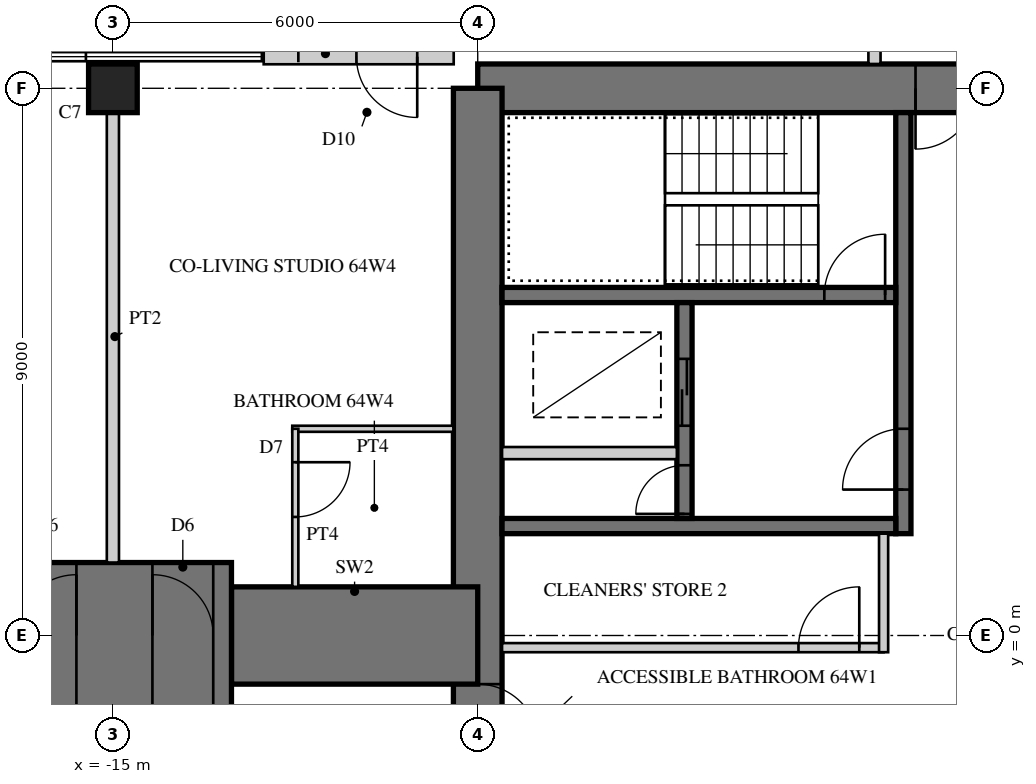
"""IFC4 building model, lengths in metres.
Left out: names, types, materials, properties, quantities, classifications, styles, units other than length and angle.
Written with IfcOpenShell. Run it as: python <this file> out.ifc"""

import sys

from ifc_helpers import new_model, si_unit, direction, frame, frame_2d, origin, origin_2d, place, context, subcontext, project, spatial, rectangle, hollow_rectangle, extrude, element, fill, save


model = new_model("IFC4")
c1 = context("Model", 3, precision=1e-05, world=origin(), true_north=direction((0.0, 1.0)))
c2 = subcontext(c1, "Body", "Model", "MODEL_VIEW")
j1 = project(units=[si_unit("LENGTHUNIT", "METRE"), si_unit("PLANEANGLEUNIT", "RADIAN")], contexts=[c1])
p1 = place(None, origin())
s1 = spatial("IfcSite", under=j1, at=p1, CompositionType="ELEMENT")
p2 = place(p1, origin())
s2 = spatial("IfcBuilding", under=s1, at=p2, CompositionType="ELEMENT")
p3 = place(p2, frame((0.0, 0.0, 249.3)))
s3 = spatial("IfcBuildingStorey", under=s2, at=p3, CompositionType="ELEMENT", Elevation=249.3)
p4 = place(p3, frame((9.0, 9.0, 0.0), z_axis=(0.0, 0.0, 1.0), x_axis=(-1.0, 0.0, 0.0)))
e1 = element("IfcWall", 1, at=p4, inside=s3, PredefinedType="SHEAR", context=c2, shape_type="SweptSolid", body=[
    extrude(rectangle(XDim=18.0, YDim=0.8, at=frame_2d((9.0, 0.0))), origin(), (0.0, 0.0, 1.0), 3.4),
])
p5 = place(p4, frame((9.8, 0.0, 0.0)))
e2 = element("IfcOpeningElement", 2, at=p5, cuts=e1, PredefinedType="OPENING", context=c2, shape_type="SweptSolid", body=[
    extrude(rectangle(XDim=1.0, YDim=2.4, at=frame_2d((0.5, 1.2))), frame((0.0, 0.41, 0.0), z_axis=(0.0, -1.0, 0.0), x_axis=(1.0, 0.0, 0.0)), (0.0, 0.0, 1.0), 0.82),
])
p6 = place(p3, frame((-9.0, 9.0, 0.0), z_axis=(0.0, 0.0, 1.0), x_axis=(0.0, -1.0, 0.0)))
e3 = element("IfcWall", 3, at=p6, inside=s3, PredefinedType="SHEAR", context=c2, shape_type="SweptSolid", body=[
    extrude(rectangle(XDim=18.0, YDim=0.8, at=frame_2d((9.0, 0.0))), origin(), (0.0, 0.0, 1.0), 3.4),
])
p7 = place(p6, frame((9.8, 0.0, 0.0)))
e4 = element("IfcOpeningElement", 4, at=p7, cuts=e3, PredefinedType="OPENING", context=c2, shape_type="SweptSolid", body=[
    extrude(rectangle(XDim=1.0, YDim=2.4, at=frame_2d((0.5, 1.2))), frame((0.0, 0.41, 0.0), z_axis=(0.0, -1.0, 0.0), x_axis=(1.0, 0.0, 0.0)), (0.0, 0.0, 1.0), 0.82),
])
p8 = place(p3, frame((-2.0, 1.675, 0.0), z_axis=(0.0, 0.0, 1.0), x_axis=(0.0, 1.0, 0.0)))
e5 = element("IfcWall", 5, at=p8, inside=s3, PredefinedType="SHEAR", context=c2, shape_type="SweptSolid", body=[
    extrude(rectangle(XDim=6.925, YDim=0.25, at=frame_2d((3.462, 0.0))), origin(), (0.0, 0.0, 1.0), 3.4),
])
p9 = place(p8, frame((0.725, 0.0, 0.0)))
e6 = element("IfcOpeningElement", 6, at=p9, cuts=e5, PredefinedType="OPENING", context=c2, shape_type="SweptSolid", body=[
    extrude(rectangle(XDim=1.0, YDim=2.1, at=frame_2d((0.5, 1.05))), frame((0.0, 0.135, 0.0), z_axis=(0.0, -1.0, 0.0), x_axis=(1.0, 0.0, 0.0)), (0.0, 0.0, 1.0), 0.27),
])
p10 = place(p3, frame((-2.125, 1.8, 0.0), z_axis=(0.0, 0.0, 1.0), x_axis=(-1.0, 0.0, 0.0)))
e7 = element("IfcWall", 7, at=p10, inside=s3, PredefinedType="SHEAR", context=c2, shape_type="SweptSolid", body=[
    extrude(rectangle(XDim=6.475, YDim=0.25, at=frame_2d((3.238, 0.0))), origin(), (0.0, 0.0, 1.0), 3.4),
])
p11 = place(p3, frame((-2.125, 5.6, 0.0), z_axis=(0.0, 0.0, 1.0), x_axis=(-1.0, 0.0, 0.0)))
e8 = element("IfcWall", 8, at=p11, inside=s3, PredefinedType="SHEAR", context=c2, shape_type="SweptSolid", body=[
    extrude(rectangle(XDim=6.475, YDim=0.25, at=frame_2d((3.238, 0.0))), origin(), (0.0, 0.0, 1.0), 3.4),
])
p12 = place(p11, frame((0.175, 0.0, 0.0)))
e9 = element("IfcOpeningElement", 9, at=p12, cuts=e8, PredefinedType="OPENING", context=c2, shape_type="SweptSolid", body=[
    extrude(rectangle(XDim=1.0, YDim=2.1, at=frame_2d((0.5, 1.05))), frame((0.0, 0.135, 0.0), z_axis=(0.0, -1.0, 0.0), x_axis=(1.0, 0.0, 0.0)), (0.0, 0.0, 1.0), 0.27),
])
p13 = place(p3, frame((-5.6, 1.925, 0.0), z_axis=(0.0, 0.0, 1.0), x_axis=(0.0, 1.0, 0.0)))
e10 = element("IfcWall", 10, at=p13, inside=s3, PredefinedType="SHEAR", context=c2, shape_type="SweptSolid", body=[
    extrude(rectangle(XDim=3.55, YDim=0.25, at=frame_2d((1.775, 0.0))), origin(), (0.0, 0.0, 1.0), 3.4),
])
p14 = place(p13, frame((1.525, 0.0, 0.0)))
e11 = element("IfcOpeningElement", 11, at=p14, cuts=e10, PredefinedType="OPENING", context=c2, shape_type="SweptSolid", body=[
    extrude(rectangle(XDim=1.1, YDim=2.2, at=frame_2d((0.55, 1.1))), frame((0.0, 0.135, 0.0), z_axis=(0.0, -1.0, 0.0), x_axis=(1.0, 0.0, 0.0)), (0.0, 0.0, 1.0), 0.27),
])
p15 = place(p13, frame((0.075, 0.0, 0.0)))
e12 = element("IfcOpeningElement", 12, at=p15, cuts=e10, PredefinedType="OPENING", context=c2, shape_type="SweptSolid", body=[
    extrude(rectangle(XDim=0.8, YDim=2.1, at=frame_2d((0.4, 1.05))), frame((0.0, 0.135, 0.0), z_axis=(0.0, -1.0, 0.0), x_axis=(1.0, 0.0, 0.0)), (0.0, 0.0, 1.0), 0.27),
])
p16 = place(p3, frame((-5.725, 3.0, 0.0), z_axis=(0.0, 0.0, 1.0), x_axis=(-1.0, 0.0, 0.0)))
e13 = element("IfcWall", 13, at=p16, inside=s3, PredefinedType="PARTITIONING", context=c2, shape_type="SweptSolid", body=[
    extrude(rectangle(XDim=2.875, YDim=0.2, at=frame_2d((1.438, 0.0))), origin(), (0.0, 0.0, 1.0), 3.4),
])
p17 = place(p3, frame((-9.0, 0.0, 0.0), z_axis=(0.0, 0.0, 1.0), x_axis=(-1.0, 0.0, 0.0)))
e14 = element("IfcWall", 14, at=p17, inside=s3, PredefinedType="SHEAR", context=c2, shape_type="SweptSolid", body=[
    extrude(rectangle(XDim=4.05, YDim=1.6, at=frame_2d((2.025, 0.0))), origin(), (0.0, 0.0, 1.0), 3.4),
])
p18 = place(p3, frame((-13.05, 0.0, 0.0), z_axis=(0.0, 0.0, 1.0), x_axis=(-1.0, 0.0, 0.0)))
e15 = element("IfcWall", 15, at=p18, inside=s3, PredefinedType="SHEAR", context=c2, shape_type="SweptSolid", body=[
    extrude(rectangle(XDim=13.95, YDim=2.4, at=frame_2d((6.975, 0.0))), origin(), (0.0, 0.0, 1.0), 3.4),
])
p19 = place(p18, frame((0.3, 0.0, 0.0)))
e16 = element("IfcOpeningElement", 16, at=p19, cuts=e15, PredefinedType="OPENING", context=c2, shape_type="SweptSolid", body=[
    extrude(rectangle(XDim=1.0, YDim=2.15, at=frame_2d((0.5, 1.075))), frame((0.0, 1.21, 0.0), z_axis=(0.0, -1.0, 0.0), x_axis=(1.0, 0.0, 0.0)), (0.0, 0.0, 1.0), 2.42),
])
p20 = place(p18, frame((2.55, 0.0, 0.0)))
e17 = element("IfcOpeningElement", 17, at=p20, cuts=e15, PredefinedType="OPENING", context=c2, shape_type="SweptSolid", body=[
    extrude(rectangle(XDim=1.0, YDim=2.15, at=frame_2d((0.5, 1.075))), frame((0.0, 1.21, 0.0), z_axis=(0.0, -1.0, 0.0), x_axis=(1.0, 0.0, 0.0)), (0.0, 0.0, 1.0), 2.42),
])
p21 = place(p18, frame((9.25, 0.0, 0.0)))
e18 = element("IfcOpeningElement", 18, at=p21, cuts=e15, PredefinedType="OPENING", context=c2, shape_type="SweptSolid", body=[
    extrude(rectangle(XDim=1.0, YDim=2.0, at=frame_2d((0.5, 1.0))), frame((0.0, 1.21, 0.0), z_axis=(0.0, -1.0, 0.0), x_axis=(1.0, 0.0, 0.0)), (0.0, 0.0, 1.0), 2.42),
])
p22 = place(p3, frame((-15.0, 9.0, 0.0), z_axis=(0.0, 0.0, 1.0), x_axis=(1.0, 0.0, 0.0)))
e19 = element("IfcColumn", 19, at=p22, inside=s3, PredefinedType="COLUMN", context=c2, shape_type="SweptSolid", body=[
    extrude(rectangle(XDim=0.8, YDim=0.8, at=origin_2d()), origin(), (0.0, 0.0, 1.0), 3.4),
])
p23 = place(p3, frame((-9.395, 9.52, 0.0), z_axis=(0.0, 0.0, 1.0), x_axis=(-1.0, 0.0, 0.0)))
e20 = element("IfcWall", 20, at=p23, inside=s3, PredefinedType="SOLIDWALL", context=c2, shape_type="SweptSolid", body=[
    extrude(rectangle(XDim=3.125, YDim=0.25, at=frame_2d((1.562, 0.0))), origin(), (0.0, 0.0, 1.0), 3.15),
])
p24 = place(p23, frame((0.6, 0.0, 0.0)))
e21 = element("IfcOpeningElement", 21, at=p24, cuts=e20, PredefinedType="OPENING", context=c2, shape_type="SweptSolid", body=[
    extrude(rectangle(XDim=1.0, YDim=2.2, at=frame_2d((0.5, 1.1))), frame((0.0, 0.135, 0.0), z_axis=(0.0, -1.0, 0.0), x_axis=(1.0, 0.0, 0.0)), (0.0, 0.0, 1.0), 0.27),
])
p25 = place(p3, frame((-2.325, -0.2, 0.0), z_axis=(0.0, 0.0, 1.0), x_axis=(-1.0, 0.0, 0.0)))
e22 = element("IfcWall", 22, at=p25, inside=s3, PredefinedType="PARTITIONING", context=c2, shape_type="SweptSolid", body=[
    extrude(rectangle(XDim=6.275, YDim=0.15, at=frame_2d((3.138, 0.0))), origin(), (0.0, 0.0, 1.0), 3.15),
])
p26 = place(p25, frame((0.4, 0.0, 0.0)))
e23 = element("IfcOpeningElement", 23, at=p26, cuts=e22, PredefinedType="OPENING", context=c2, shape_type="SweptSolid", body=[
    extrude(rectangle(XDim=1.0, YDim=2.1, at=frame_2d((0.5, 1.05))), frame((0.0, 0.085, 0.0), z_axis=(0.0, -1.0, 0.0), x_axis=(1.0, 0.0, 0.0)), (0.0, 0.0, 1.0), 0.17),
])
p27 = place(p3, frame((-2.325, 1.675, 0.0), z_axis=(0.0, 0.0, 1.0), x_axis=(0.0, -1.0, 0.0)))
e24 = element("IfcWall", 24, at=p27, inside=s3, PredefinedType="PARTITIONING", context=c2, shape_type="SweptSolid", body=[
    extrude(rectangle(XDim=1.95, YDim=0.15, at=frame_2d((0.975, 0.0))), origin(), (0.0, 0.0, 1.0), 3.15),
])
p28 = place(p3, frame((-2.475, 9.4, 0.0), z_axis=(0.0, 0.0, 1.0), x_axis=(0.0, 1.0, 0.0)))
e25 = element("IfcWall", 25, at=p28, inside=s3, PredefinedType="SOLIDWALL", context=c2, shape_type="SweptSolid", body=[
    extrude(rectangle(XDim=5.6, YDim=0.2, at=frame_2d((2.8, 0.0))), origin(), (0.0, 0.0, 1.0), 3.15),
])
p29 = place(p28, frame((1.2, 0.0, 0.0)))
e26 = element("IfcOpeningElement", 26, at=p29, cuts=e25, PredefinedType="OPENING", context=c2, shape_type="SweptSolid", body=[
    extrude(rectangle(XDim=1.0, YDim=2.2, at=frame_2d((0.5, 1.1))), frame((0.0, 0.11, 0.0), z_axis=(0.0, -1.0, 0.0), x_axis=(1.0, 0.0, 0.0)), (0.0, 0.0, 1.0), 0.22),
])
p30 = place(p3, frame((-9.4, 3.4, 0.0), z_axis=(0.0, 0.0, 1.0), x_axis=(-1.0, 0.0, 0.0)))
e27 = element("IfcWall", 27, at=p30, inside=s3, PredefinedType="PARTITIONING", context=c2, shape_type="SweptSolid", body=[
    extrude(rectangle(XDim=2.65, YDim=0.1, at=frame_2d((1.325, 0.0))), origin(), (0.0, 0.0, 1.0), 3.15),
])
p31 = place(p3, frame((-12.0, 3.4, 0.0), z_axis=(0.0, 0.0, 1.0), x_axis=(0.0, -1.0, 0.0)))
e28 = element("IfcWall", 28, at=p31, inside=s3, PredefinedType="PARTITIONING", context=c2, shape_type="SweptSolid", body=[
    extrude(rectangle(XDim=2.6, YDim=0.1, at=frame_2d((1.3, 0.0))), origin(), (0.0, 0.0, 1.0), 3.15),
])
p32 = place(p31, frame((0.55, 0.0, 0.0)))
e29 = element("IfcOpeningElement", 29, at=p32, cuts=e28, PredefinedType="OPENING", context=c2, shape_type="SweptSolid", body=[
    extrude(rectangle(XDim=0.9, YDim=2.1, at=frame_2d((0.45, 1.05))), frame((0.0, 0.06, 0.0), z_axis=(0.0, -1.0, 0.0), x_axis=(1.0, 0.0, 0.0)), (0.0, 0.0, 1.0), 0.12),
])
p33 = place(p3, frame((-15.0, 8.6, 0.0), z_axis=(0.0, 0.0, 1.0), x_axis=(0.0, -1.0, 0.0)))
e30 = element("IfcWall", 30, at=p33, inside=s3, PredefinedType="SOLIDWALL", context=c2, shape_type="SweptSolid", body=[
    extrude(rectangle(XDim=7.4, YDim=0.2, at=frame_2d((3.7, 0.0))), origin(), (0.0, 0.0, 1.0), 2.1),
])
p34 = place(p24, origin())
e31 = element("IfcDoor", 31, at=p34, inside=s3, OperationType="SINGLE_SWING_LEFT", PredefinedType="DOOR", context=c2, shape_type="SweptSolid", body=[
    extrude(hollow_rectangle(XDim=1.0, YDim=2.2, WallThickness=0.06, at=frame_2d((0.5, 1.1))), frame((0.0, 0.025, 0.0), z_axis=(0.0, -1.0, 0.0), x_axis=(1.0, 0.0, 0.0)), (0.0, 0.0, 1.0), 0.05),
    extrude(rectangle(XDim=0.879, YDim=2.079, at=frame_2d((0.5, 1.1))), frame((0.0, 0.025, 0.0), z_axis=(0.0, -1.0, 0.0), x_axis=(1.0, 0.0, 0.0)), (0.0, 0.0, 1.0), 0.05),
])
fill(e21, e31)
p35 = place(p26, frame((1.0, 0.0, 0.0), z_axis=(0.0, 0.0, 1.0), x_axis=(-1.0, 0.0, 0.0)))
e32 = element("IfcDoor", 32, at=p35, inside=s3, OperationType="SINGLE_SWING_RIGHT", PredefinedType="DOOR", context=c2, shape_type="SweptSolid", body=[
    extrude(rectangle(XDim=1.0, YDim=2.1, at=frame_2d((0.5, 1.05))), frame((0.0, 0.025, 0.0), z_axis=(0.0, -1.0, 0.0), x_axis=(1.0, 0.0, 0.0)), (0.0, 0.0, 1.0), 0.05),
])
fill(e23, e32)
p36 = place(p32, origin())
e33 = element("IfcDoor", 33, at=p36, inside=s3, OperationType="SINGLE_SWING_LEFT", PredefinedType="DOOR", context=c2, shape_type="SweptSolid", body=[
    extrude(rectangle(XDim=0.9, YDim=2.1, at=frame_2d((0.45, 1.05))), frame((0.0, 0.025, 0.0), z_axis=(0.0, -1.0, 0.0), x_axis=(1.0, 0.0, 0.0)), (0.0, 0.0, 1.0), 0.05),
])
fill(e29, e33)
p37 = place(p19, frame((1.0, 0.0, 0.0), z_axis=(0.0, 0.0, 1.0), x_axis=(-1.0, 0.0, 0.0)))
e34 = element("IfcDoor", 34, at=p37, inside=s3, OperationType="SINGLE_SWING_LEFT", PredefinedType="DOOR", context=c2, shape_type="SweptSolid", body=[
    extrude(rectangle(XDim=1.0, YDim=2.15, at=frame_2d((0.5, 1.075))), frame((0.0, 0.025, 0.0), z_axis=(0.0, -1.0, 0.0), x_axis=(1.0, 0.0, 0.0)), (0.0, 0.0, 1.0), 0.05),
])
fill(e16, e34)
p38 = place(p20, frame((1.0, 0.0, 0.0), z_axis=(0.0, 0.0, 1.0), x_axis=(-1.0, 0.0, 0.0)))
e35 = element("IfcDoor", 35, at=p38, inside=s3, OperationType="SINGLE_SWING_RIGHT", PredefinedType="DOOR", context=c2, shape_type="SweptSolid", body=[
    extrude(rectangle(XDim=1.0, YDim=2.15, at=frame_2d((0.5, 1.075))), frame((0.0, 0.025, 0.0), z_axis=(0.0, -1.0, 0.0), x_axis=(1.0, 0.0, 0.0)), (0.0, 0.0, 1.0), 0.05),
])
fill(e17, e35)
p39 = place(p5, origin())
e36 = element("IfcDoor", 36, at=p39, inside=s3, OperationType="SINGLE_SWING_RIGHT", PredefinedType="DOOR", context=c2, shape_type="SweptSolid", body=[
    extrude(rectangle(XDim=1.0, YDim=2.4, at=frame_2d((0.5, 1.2))), frame((0.0, 0.055, 0.0), z_axis=(0.0, -1.0, 0.0), x_axis=(1.0, 0.0, 0.0)), (0.0, 0.0, 1.0), 0.05),
])
fill(e2, e36)
p40 = place(p7, origin())
e37 = element("IfcDoor", 37, at=p40, inside=s3, OperationType="SINGLE_SWING_RIGHT", PredefinedType="DOOR", context=c2, shape_type="SweptSolid", body=[
    extrude(rectangle(XDim=1.0, YDim=2.4, at=frame_2d((0.5, 1.2))), frame((0.0, 0.055, 0.0), z_axis=(0.0, -1.0, 0.0), x_axis=(1.0, 0.0, 0.0)), (0.0, 0.0, 1.0), 0.05),
])
fill(e4, e37)
p41 = place(p9, origin())
e38 = element("IfcDoor", 38, at=p41, inside=s3, OperationType="SINGLE_SWING_LEFT", PredefinedType="DOOR", context=c2, shape_type="SweptSolid", body=[
    extrude(rectangle(XDim=1.0, YDim=2.1, at=frame_2d((0.5, 1.05))), frame((0.0, 0.025, 0.0), z_axis=(0.0, -1.0, 0.0), x_axis=(1.0, 0.0, 0.0)), (0.0, 0.0, 1.0), 0.05),
])
fill(e6, e38)
p42 = place(p12, frame((1.0, 0.0, 0.0), z_axis=(0.0, 0.0, 1.0), x_axis=(-1.0, 0.0, 0.0)))
e39 = element("IfcDoor", 39, at=p42, inside=s3, OperationType="SINGLE_SWING_RIGHT", PredefinedType="DOOR", context=c2, shape_type="SweptSolid", body=[
    extrude(rectangle(XDim=1.0, YDim=2.1, at=frame_2d((0.5, 1.05))), frame((0.0, 0.025, 0.0), z_axis=(0.0, -1.0, 0.0), x_axis=(1.0, 0.0, 0.0)), (0.0, 0.0, 1.0), 0.05),
])
fill(e9, e39)
p43 = place(p14, origin())
e40 = element("IfcDoor", 40, at=p43, inside=s3, OperationType="DOUBLE_DOOR_SLIDING", PredefinedType="DOOR", context=c2, shape_type="SweptSolid", body=[
    extrude(rectangle(XDim=1.1, YDim=2.2, at=frame_2d((0.55, 1.1))), frame((0.0, 0.025, 0.0), z_axis=(0.0, -1.0, 0.0), x_axis=(1.0, 0.0, 0.0)), (0.0, 0.0, 1.0), 0.05),
])
fill(e11, e40)
p44 = place(p15, origin())
e41 = element("IfcDoor", 41, at=p44, inside=s3, OperationType="SINGLE_SWING_LEFT", PredefinedType="DOOR", context=c2, shape_type="SweptSolid", body=[
    extrude(rectangle(XDim=0.8, YDim=2.1, at=frame_2d((0.4, 1.05))), frame((0.0, 0.025, 0.0), z_axis=(0.0, -1.0, 0.0), x_axis=(1.0, 0.0, 0.0)), (0.0, 0.0, 1.0), 0.05),
])
fill(e12, e41)
save(model, sys.argv[1])
